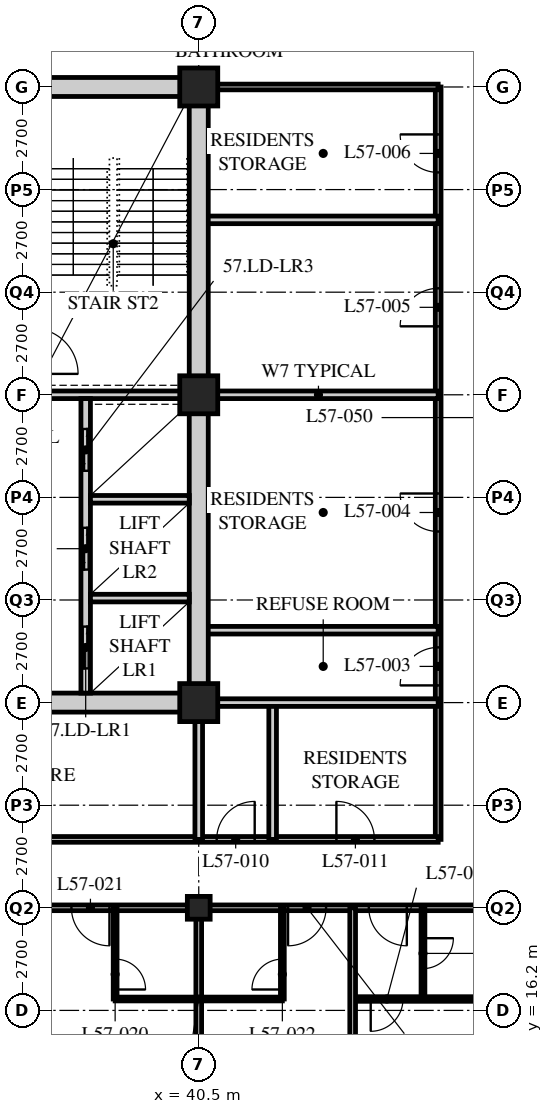
"""IFC4 building model, lengths in metres.
Left out: names, types, materials, properties, quantities, classifications, styles, units other than length and angle.
Written with IfcOpenShell. Run it as: python <this file> out.ifc"""

import sys

from ifc_helpers import new_model, si_unit, direction, frame, frame_2d, origin, origin_2d, place, context, subcontext, project, spatial, rectangle, hollow_rectangle, extrude, element, fill, save


model = new_model("IFC4")
c1 = context("Model", 3, precision=1e-05, world=origin(), true_north=direction((0.0, 1.0)))
c2 = subcontext(c1, "Body", "Model", "MODEL_VIEW")
j1 = project(units=[si_unit("LENGTHUNIT", "METRE"), si_unit("PLANEANGLEUNIT", "RADIAN")], contexts=[c1])
p1 = place(None, origin())
s1 = spatial("IfcSite", under=j1, at=p1, CompositionType="ELEMENT")
p2 = place(p1, origin())
s2 = spatial("IfcBuilding", under=s1, at=p2, CompositionType="ELEMENT")
p3 = place(p2, frame((0.0, 0.0, 220.8)))
s3 = spatial("IfcBuildingStorey", under=s2, at=p3, CompositionType="ELEMENT", Elevation=220.8)
p4 = place(p3, frame((40.5, 18.9, 0.0), z_axis=(0.0, 0.0, 1.0), x_axis=(1.0, 0.0, 0.0)))
e1 = element("IfcColumn", 1, at=p4, inside=s3, PredefinedType="COLUMN", context=c2, shape_type="SweptSolid", body=[
    extrude(hollow_rectangle(XDim=0.6, YDim=0.6, WallThickness=0.05, at=origin_2d()), origin(), (0.0, 0.0, 1.0), 3.6),
])
for number, where, z_axis, x_axis in (
    (2, (40.5, 24.3, 0.0), (0.0, 0.0, 1.0), (1.0, 0.0, 0.0)),
    (3, (40.5, 32.4, 0.0), (0.0, 0.0, 1.0), (1.0, 0.0, 0.0)),
    (4, (40.5, 40.5, 0.0), (0.0, 0.0, 1.0), (1.0, 0.0, 0.0)),
):
    element("IfcColumn", number, at=place(p3, frame(where, z_axis=z_axis, x_axis=x_axis)), inside=s3, PredefinedType="COLUMN", context=c2, shape_type="SweptSolid", body=[
        extrude(hollow_rectangle(XDim=1.0, YDim=1.0, WallThickness=0.1, at=origin_2d()), origin(), (0.0, 0.0, 1.0), 3.6),
    ])
p5 = place(p3, frame((12.15, 18.9, 0.0), z_axis=(0.0, 0.0, 1.0), x_axis=(1.0, 0.0, 0.0)))
e5 = element("IfcWall", 5, at=p5, inside=s3, PredefinedType="PARTITIONING", context=c2, shape_type="SweptSolid", body=[
    extrude(rectangle(XDim=36.45, YDim=0.15, at=frame_2d((18.225, 0.0))), origin(), (0.0, 0.0, 1.0), 2.628),
])
p6 = place(p5, frame((4.95, 0.0, 0.0)))
e6 = element("IfcOpeningElement", 6, at=p6, cuts=e5, PredefinedType="OPENING", context=c2, shape_type="SweptSolid", body=[
    extrude(rectangle(XDim=1.0, YDim=2.1, at=frame_2d((0.5, 1.05))), frame((0.0, 0.085, 0.0), z_axis=(0.0, -1.0, 0.0), x_axis=(1.0, 0.0, 0.0)), (0.0, 0.0, 1.0), 0.17),
])
p7 = place(p5, frame((22.6, 0.0, 0.0)))
e7 = element("IfcOpeningElement", 7, at=p7, cuts=e5, PredefinedType="OPENING", context=c2, shape_type="SweptSolid", body=[
    extrude(rectangle(XDim=1.0, YDim=2.1, at=frame_2d((0.5, 1.05))), frame((0.0, 0.085, 0.0), z_axis=(0.0, -1.0, 0.0), x_axis=(1.0, 0.0, 0.0)), (0.0, 0.0, 1.0), 0.17),
])
p8 = place(p5, frame((25.0, 0.0, 0.0)))
e8 = element("IfcOpeningElement", 8, at=p8, cuts=e5, PredefinedType="OPENING", context=c2, shape_type="SweptSolid", body=[
    extrude(rectangle(XDim=1.0, YDim=2.1, at=frame_2d((0.5, 1.05))), frame((0.0, 0.085, 0.0), z_axis=(0.0, -1.0, 0.0), x_axis=(1.0, 0.0, 0.0)), (0.0, 0.0, 1.0), 0.17),
])
p9 = place(p5, frame((30.7, 0.0, 0.0)))
e9 = element("IfcOpeningElement", 9, at=p9, cuts=e5, PredefinedType="OPENING", context=c2, shape_type="SweptSolid", body=[
    extrude(rectangle(XDim=1.0, YDim=2.1, at=frame_2d((0.5, 1.05))), frame((0.0, 0.085, 0.0), z_axis=(0.0, -1.0, 0.0), x_axis=(1.0, 0.0, 0.0)), (0.0, 0.0, 1.0), 0.17),
])
p10 = place(p5, frame((1.525, 0.0, 0.0)))
e10 = element("IfcOpeningElement", 10, at=p10, cuts=e5, PredefinedType="OPENING", context=c2, shape_type="SweptSolid", body=[
    extrude(rectangle(XDim=1.0, YDim=2.1, at=frame_2d((0.5, 1.05))), frame((0.0, 0.085, 0.0), z_axis=(0.0, -1.0, 0.0), x_axis=(1.0, 0.0, 0.0)), (0.0, 0.0, 1.0), 0.17),
])
p11 = place(p5, frame((32.825, 0.0, 0.0)))
e11 = element("IfcOpeningElement", 11, at=p11, cuts=e5, PredefinedType="OPENING", context=c2, shape_type="SweptSolid", body=[
    extrude(rectangle(XDim=1.0, YDim=2.1, at=frame_2d((0.5, 1.05))), frame((0.0, 0.085, 0.0), z_axis=(0.0, -1.0, 0.0), x_axis=(1.0, 0.0, 0.0)), (0.0, 0.0, 1.0), 0.17),
])
p12 = place(p3, frame((46.8, 20.7, 0.0), z_axis=(0.0, 0.0, 1.0), x_axis=(0.0, 1.0, 0.0)))
e12 = element("IfcWall", 12, at=p12, inside=s3, PredefinedType="PARTITIONING", context=c2, shape_type="SweptSolid", body=[
    extrude(rectangle(XDim=19.8, YDim=0.15, at=frame_2d((9.9, 0.0))), origin(), (0.0, 0.0, 1.0), 3.39),
])
p13 = place(p12, frame((4.052, 0.0, 0.0)))
e13 = element("IfcOpeningElement", 13, at=p13, cuts=e12, PredefinedType="OPENING", context=c2, shape_type="SweptSolid", body=[
    extrude(rectangle(XDim=1.0, YDim=2.1, at=frame_2d((0.5, 1.05))), frame((0.0, 0.085, 0.0), z_axis=(0.0, -1.0, 0.0), x_axis=(1.0, 0.0, 0.0)), (0.0, 0.0, 1.0), 0.17),
])
p14 = place(p12, frame((8.102, 0.0, 0.0)))
e14 = element("IfcOpeningElement", 14, at=p14, cuts=e12, PredefinedType="OPENING", context=c2, shape_type="SweptSolid", body=[
    extrude(rectangle(XDim=1.0, YDim=2.1, at=frame_2d((0.5, 1.05))), frame((0.0, 0.085, 0.0), z_axis=(0.0, -1.0, 0.0), x_axis=(1.0, 0.0, 0.0)), (0.0, 0.0, 1.0), 0.17),
])
p15 = place(p12, frame((13.502, 0.0, 0.0)))
e15 = element("IfcOpeningElement", 15, at=p15, cuts=e12, PredefinedType="OPENING", context=c2, shape_type="SweptSolid", body=[
    extrude(rectangle(XDim=1.0, YDim=2.1, at=frame_2d((0.5, 1.05))), frame((0.0, 0.085, 0.0), z_axis=(0.0, -1.0, 0.0), x_axis=(1.0, 0.0, 0.0)), (0.0, 0.0, 1.0), 0.17),
])
p16 = place(p12, frame((17.552, 0.0, 0.0)))
e16 = element("IfcOpeningElement", 16, at=p16, cuts=e12, PredefinedType="OPENING", context=c2, shape_type="SweptSolid", body=[
    extrude(rectangle(XDim=1.0, YDim=2.1, at=frame_2d((0.5, 1.05))), frame((0.0, 0.085, 0.0), z_axis=(0.0, -1.0, 0.0), x_axis=(1.0, 0.0, 0.0)), (0.0, 0.0, 1.0), 0.17),
])
p17 = place(p3, frame((46.8, 40.5, 0.0), z_axis=(0.0, 0.0, 1.0), x_axis=(-1.0, 0.0, 0.0)))
e17 = element("IfcWall", 17, at=p17, inside=s3, PredefinedType="PARTITIONING", context=c2, shape_type="SweptSolid", body=[
    extrude(rectangle(XDim=6.1, YDim=0.15, at=frame_2d((3.05, 0.0))), origin(), (0.0, 0.0, 1.0), 3.39),
])
p18 = place(p3, frame((29.56, 20.7, 0.0), z_axis=(0.0, 0.0, 1.0), x_axis=(1.0, 0.0, 0.0)))
e18 = element("IfcWall", 18, at=p18, inside=s3, PredefinedType="PARTITIONING", context=c2, shape_type="SweptSolid", body=[
    extrude(rectangle(XDim=17.24, YDim=0.15, at=frame_2d((8.62, 0.0))), origin(), (0.0, 0.0, 1.0), 3.39),
])
p19 = place(p18, frame((4.965, 0.0, 0.0)))
e19 = element("IfcOpeningElement", 19, at=p19, cuts=e18, PredefinedType="OPENING", context=c2, shape_type="SweptSolid", body=[
    extrude(rectangle(XDim=1.0, YDim=2.1, at=frame_2d((0.5, 1.05))), frame((0.0, 0.085, 0.0), z_axis=(0.0, -1.0, 0.0), x_axis=(1.0, 0.0, 0.0)), (0.0, 0.0, 1.0), 0.17),
])
p20 = place(p18, frame((11.412, 0.0, 0.0)))
e20 = element("IfcOpeningElement", 20, at=p20, cuts=e18, PredefinedType="OPENING", context=c2, shape_type="SweptSolid", body=[
    extrude(rectangle(XDim=1.0, YDim=2.1, at=frame_2d((0.5, 1.05))), frame((0.0, 0.085, 0.0), z_axis=(0.0, -1.0, 0.0), x_axis=(1.0, 0.0, 0.0)), (0.0, 0.0, 1.0), 0.17),
])
p21 = place(p18, frame((14.562, 0.0, 0.0)))
e21 = element("IfcOpeningElement", 21, at=p21, cuts=e18, PredefinedType="OPENING", context=c2, shape_type="SweptSolid", body=[
    extrude(rectangle(XDim=1.0, YDim=2.1, at=frame_2d((0.5, 1.05))), frame((0.0, 0.085, 0.0), z_axis=(0.0, -1.0, 0.0), x_axis=(1.0, 0.0, 0.0)), (0.0, 0.0, 1.0), 0.17),
])
for number, where, z_axis, x_axis in (
    (22, (40.5, 32.4, 0.0), (0.0, 0.0, 1.0), (1.0, 0.0, 0.0)),
    (23, (46.8, 26.205, 0.0), (0.0, 0.0, 1.0), (-1.0, 0.0, 0.0)),
    (24, (46.8, 37.003, 0.0), (0.0, 0.0, 1.0), (-1.0, 0.0, 0.0)),
):
    element("IfcWall", number, at=place(p3, frame(where, z_axis=z_axis, x_axis=x_axis)), inside=s3, PredefinedType="SOLIDWALL", context=c2, shape_type="SweptSolid", body=[
        extrude(rectangle(XDim=6.3, YDim=0.2, at=frame_2d((3.15, 0.0))), origin(), (0.0, 0.0, 1.0), 3.39),
    ])
p22 = place(p3, frame((40.5, 20.7, 0.0), z_axis=(0.0, 0.0, 1.0), x_axis=(0.0, 1.0, 0.0)))
e25 = element("IfcWall", 25, at=p22, inside=s3, PredefinedType="SOLIDWALL", context=c2, shape_type="SweptSolid", body=[
    extrude(rectangle(XDim=3.6, YDim=0.2, at=frame_2d((1.8, 0.0))), origin(), (0.0, 0.0, 1.0), 2.628),
])
p23 = place(p3, frame((42.444, 20.7, 0.0), z_axis=(0.0, 0.0, 1.0), x_axis=(0.0, 1.0, 0.0)))
e26 = element("IfcWall", 26, at=p23, inside=s3, PredefinedType="SOLIDWALL", context=c2, shape_type="SweptSolid", body=[
    extrude(rectangle(XDim=3.6, YDim=0.2, at=frame_2d((1.8, 0.0))), origin(), (0.0, 0.0, 1.0), 3.39),
])
p24 = place(p3, frame((40.5, 24.3, 0.0), z_axis=(0.0, 0.0, 1.0), x_axis=(1.0, 0.0, 0.0)))
e27 = element("IfcWall", 27, at=p24, inside=s3, PredefinedType="SOLIDWALL", context=c2, shape_type="SweptSolid", body=[
    extrude(rectangle(XDim=6.3, YDim=0.2, at=frame_2d((3.15, 0.0))), origin(), (0.0, 0.0, 1.0), 3.39),
])
p25 = place(p3, frame((38.3, 16.5, 0.0), z_axis=(0.0, 0.0, 1.0), x_axis=(1.0, 0.0, 0.0)))
e28 = element("IfcWall", 28, at=p25, inside=s3, PredefinedType="PARTITIONING", context=c2, shape_type="SweptSolid", body=[
    extrude(rectangle(XDim=4.4, YDim=0.1, at=frame_2d((2.2, 0.0))), origin(), (0.0, 0.0, 1.0), 3.39),
])
p26 = place(p3, frame((38.3, 18.9, 0.0), z_axis=(0.0, 0.0, 1.0), x_axis=(0.0, -1.0, 0.0)))
e29 = element("IfcWall", 29, at=p26, inside=s3, PredefinedType="PARTITIONING", context=c2, shape_type="SweptSolid", body=[
    extrude(rectangle(XDim=2.4, YDim=0.1, at=frame_2d((1.2, 0.0))), origin(), (0.0, 0.0, 1.0), 3.39),
])
p27 = place(p26, frame((1.35, 0.0, 0.0)))
e30 = element("IfcOpeningElement", 30, at=p27, cuts=e29, PredefinedType="OPENING", context=c2, shape_type="SweptSolid", body=[
    extrude(rectangle(XDim=0.8, YDim=2.1, at=frame_2d((0.4, 1.05))), frame((0.0, 0.06, 0.0), z_axis=(0.0, -1.0, 0.0), x_axis=(1.0, 0.0, 0.0)), (0.0, 0.0, 1.0), 0.12),
])
p28 = place(p3, frame((40.5, 18.9, 0.0), z_axis=(0.0, 0.0, 1.0), x_axis=(0.0, -1.0, 0.0)))
e31 = element("IfcWall", 31, at=p28, inside=s3, PredefinedType="PARTITIONING", context=c2, shape_type="SweptSolid", body=[
    extrude(rectangle(XDim=7.8, YDim=0.15, at=frame_2d((3.9, 0.0))), origin(), (0.0, 0.0, 1.0), 2.628),
])
p29 = place(p3, frame((42.7, 18.9, 0.0), z_axis=(0.0, 0.0, 1.0), x_axis=(0.0, -1.0, 0.0)))
e32 = element("IfcWall", 32, at=p29, inside=s3, PredefinedType="PARTITIONING", context=c2, shape_type="SweptSolid", body=[
    extrude(rectangle(XDim=2.4, YDim=0.1, at=frame_2d((1.2, 0.0))), origin(), (0.0, 0.0, 1.0), 3.39),
])
p30 = place(p29, frame((1.35, 0.0, 0.0)))
e33 = element("IfcOpeningElement", 33, at=p30, cuts=e32, PredefinedType="OPENING", context=c2, shape_type="SweptSolid", body=[
    extrude(rectangle(XDim=0.8, YDim=2.1, at=frame_2d((0.4, 1.05))), frame((0.0, 0.06, 0.0), z_axis=(0.0, -1.0, 0.0), x_axis=(1.0, 0.0, 0.0)), (0.0, 0.0, 1.0), 0.12),
])
p31 = place(p3, frame((44.55, 16.5, 0.0), z_axis=(0.0, 0.0, 1.0), x_axis=(1.0, 0.0, 0.0)))
e34 = element("IfcWall", 34, at=p31, inside=s3, PredefinedType="PARTITIONING", context=c2, shape_type="SweptSolid", body=[
    extrude(rectangle(XDim=4.05, YDim=0.12, at=frame_2d((2.025, 0.0))), origin(), (0.0, 0.0, 1.0), 3.39),
])
p32 = place(p31, frame((0.475, 0.0, 0.0)))
e35 = element("IfcOpeningElement", 35, at=p32, cuts=e34, PredefinedType="OPENING", context=c2, shape_type="SweptSolid", body=[
    extrude(rectangle(XDim=0.85, YDim=2.1, at=frame_2d((0.425, 1.05))), frame((0.0, 0.07, 0.0), z_axis=(0.0, -1.0, 0.0), x_axis=(1.0, 0.0, 0.0)), (0.0, 0.0, 1.0), 0.14),
])
p33 = place(p3, frame((46.4, 18.9, 0.0), z_axis=(0.0, 0.0, 1.0), x_axis=(0.0, -1.0, 0.0)))
e36 = element("IfcWall", 36, at=p33, inside=s3, PredefinedType="PARTITIONING", context=c2, shape_type="SweptSolid", body=[
    extrude(rectangle(XDim=2.4, YDim=0.1, at=frame_2d((1.2, 0.0))), origin(), (0.0, 0.0, 1.0), 3.39),
])
p34 = place(p33, frame((0.8, 0.0, 0.0)))
e37 = element("IfcOpeningElement", 37, at=p34, cuts=e36, PredefinedType="OPENING", context=c2, shape_type="SweptSolid", body=[
    extrude(rectangle(XDim=0.8, YDim=2.1, at=frame_2d((0.4, 1.05))), frame((0.0, 0.06, 0.0), z_axis=(0.0, -1.0, 0.0), x_axis=(1.0, 0.0, 0.0)), (0.0, 0.0, 1.0), 0.12),
])
p35 = place(p3, frame((44.55, 18.9, 0.0), z_axis=(0.0, 0.0, 1.0), x_axis=(0.0, -1.0, 0.0)))
e38 = element("IfcWall", 38, at=p35, inside=s3, PredefinedType="PARTITIONING", context=c2, shape_type="SweptSolid", body=[
    extrude(rectangle(XDim=7.8, YDim=0.15, at=frame_2d((3.9, 0.0))), origin(), (0.0, 0.0, 1.0), 3.39),
])
p36 = place(p3, frame((15.95, 24.3, 0.0), z_axis=(0.0, 0.0, 1.0), x_axis=(1.0, 0.0, 0.0)))
e39 = element("IfcWall", 39, at=p36, inside=s3, PredefinedType="SOLIDWALL", context=c2, shape_type="SweptSolid", body=[
    extrude(rectangle(XDim=24.8, YDim=0.5, at=frame_2d((12.4, 0.0))), origin(), (0.0, 0.0, 1.0), 2.628),
])
p37 = place(p36, frame((11.5, 0.0, 0.0)))
e40 = element("IfcOpeningElement", 40, at=p37, cuts=e39, PredefinedType="OPENING", context=c2, shape_type="SweptSolid", body=[
    extrude(rectangle(XDim=1.8, YDim=2.4, at=frame_2d((0.9, 1.2))), frame((0.0, 0.26, 0.0), z_axis=(0.0, -1.0, 0.0), x_axis=(1.0, 0.0, 0.0)), (0.0, 0.0, 1.0), 0.52),
])
p38 = place(p3, frame((15.95, 40.5, 0.0), z_axis=(0.0, 0.0, 1.0), x_axis=(1.0, 0.0, 0.0)))
e41 = element("IfcWall", 41, at=p38, inside=s3, PredefinedType="SOLIDWALL", context=c2, shape_type="SweptSolid", body=[
    extrude(rectangle(XDim=24.8, YDim=0.5, at=frame_2d((12.4, 0.0))), origin(), (0.0, 0.0, 1.0), 2.628),
])
p39 = place(p38, frame((11.5, 0.0, 0.0)))
e42 = element("IfcOpeningElement", 42, at=p39, cuts=e41, PredefinedType="OPENING", context=c2, shape_type="SweptSolid", body=[
    extrude(rectangle(XDim=1.8, YDim=2.4, at=frame_2d((0.9, 1.2))), frame((0.0, 0.26, 0.0), z_axis=(0.0, -1.0, 0.0), x_axis=(1.0, 0.0, 0.0)), (0.0, 0.0, 1.0), 0.52),
])
p40 = place(p3, frame((40.5, 24.55, 0.0), z_axis=(0.0, 0.0, 1.0), x_axis=(0.0, 1.0, 0.0)))
e43 = element("IfcWall", 43, at=p40, inside=s3, PredefinedType="SOLIDWALL", context=c2, shape_type="SweptSolid", body=[
    extrude(rectangle(XDim=15.7, YDim=0.5, at=frame_2d((7.85, 0.0))), origin(), (0.0, 0.0, 1.0), 2.628),
])
p41 = place(p3, frame((32.3, 32.4, 0.0), z_axis=(0.0, 0.0, 1.0), x_axis=(1.0, 0.0, 0.0)))
e44 = element("IfcWall", 44, at=p41, inside=s3, PredefinedType="SOLIDWALL", context=c2, shape_type="SweptSolid", body=[
    extrude(rectangle(XDim=7.95, YDim=0.2, at=frame_2d((3.975, 0.0))), origin(), (0.0, 0.0, 1.0), 2.778),
])
p42 = place(p3, frame((37.525, 24.55, 0.0), z_axis=(0.0, 0.0, 1.0), x_axis=(0.0, 1.0, 0.0)))
e45 = element("IfcWall", 45, at=p42, inside=s3, PredefinedType="SOLIDWALL", context=c2, shape_type="SweptSolid", body=[
    extrude(rectangle(XDim=7.75, YDim=0.25, at=frame_2d((3.875, 0.0))), origin(), (0.0, 0.0, 1.0), 3.39),
])
p43 = place(p42, frame((0.65, 0.0, 0.0)))
e46 = element("IfcOpeningElement", 46, at=p43, cuts=e45, PredefinedType="OPENING", context=c2, shape_type="SweptSolid", body=[
    extrude(rectangle(XDim=1.1, YDim=2.4, at=frame_2d((0.55, 1.2))), frame((0.0, 0.135, 0.0), z_axis=(0.0, -1.0, 0.0), x_axis=(1.0, 0.0, 0.0)), (0.0, 0.0, 1.0), 0.27),
])
p44 = place(p42, frame((3.25, 0.0, 0.0)))
e47 = element("IfcOpeningElement", 47, at=p44, cuts=e45, PredefinedType="OPENING", context=c2, shape_type="SweptSolid", body=[
    extrude(rectangle(XDim=1.1, YDim=2.4, at=frame_2d((0.55, 1.2))), frame((0.0, 0.135, 0.0), z_axis=(0.0, -1.0, 0.0), x_axis=(1.0, 0.0, 0.0)), (0.0, 0.0, 1.0), 0.27),
])
p45 = place(p42, frame((5.85, 0.0, 0.0)))
e48 = element("IfcOpeningElement", 48, at=p45, cuts=e45, PredefinedType="OPENING", context=c2, shape_type="SweptSolid", body=[
    extrude(rectangle(XDim=1.1, YDim=2.4, at=frame_2d((0.55, 1.2))), frame((0.0, 0.135, 0.0), z_axis=(0.0, -1.0, 0.0), x_axis=(1.0, 0.0, 0.0)), (0.0, 0.0, 1.0), 0.27),
])
for number, where, z_axis, x_axis in (
    (49, (37.65, 27.05, 0.0), (0.0, 0.0, 1.0), (1.0, 0.0, 0.0)),
    (50, (37.65, 29.65, 0.0), (0.0, 0.0, 1.0), (1.0, 0.0, 0.0)),
):
    element("IfcWall", number, at=place(p3, frame(where, z_axis=z_axis, x_axis=x_axis)), inside=s3, PredefinedType="SOLIDWALL", context=c2, shape_type="SweptSolid", body=[
        extrude(rectangle(XDim=2.6, YDim=0.2, at=frame_2d((1.3, 0.0))), origin(), (0.0, 0.0, 1.0), 3.39),
    ])
p46 = place(p13, origin())
e51 = element("IfcDoor", 51, at=p46, inside=s3, OperationType="SINGLE_SWING_LEFT", PredefinedType="DOOR", context=c2, shape_type="SweptSolid", body=[
    extrude(rectangle(XDim=1.0, YDim=2.1, at=frame_2d((0.5, 1.05))), frame((0.0, 0.025, 0.0), z_axis=(0.0, -1.0, 0.0), x_axis=(1.0, 0.0, 0.0)), (0.0, 0.0, 1.0), 0.05),
])
fill(e13, e51)
p47 = place(p14, origin())
e52 = element("IfcDoor", 52, at=p47, inside=s3, OperationType="SINGLE_SWING_RIGHT", PredefinedType="DOOR", context=c2, shape_type="SweptSolid", body=[
    extrude(rectangle(XDim=1.0, YDim=2.1, at=frame_2d((0.5, 1.05))), frame((0.0, 0.025, 0.0), z_axis=(0.0, -1.0, 0.0), x_axis=(1.0, 0.0, 0.0)), (0.0, 0.0, 1.0), 0.05),
])
fill(e14, e52)
p48 = place(p15, origin())
e53 = element("IfcDoor", 53, at=p48, inside=s3, OperationType="SINGLE_SWING_LEFT", PredefinedType="DOOR", context=c2, shape_type="SweptSolid", body=[
    extrude(rectangle(XDim=1.0, YDim=2.1, at=frame_2d((0.5, 1.05))), frame((0.0, 0.025, 0.0), z_axis=(0.0, -1.0, 0.0), x_axis=(1.0, 0.0, 0.0)), (0.0, 0.0, 1.0), 0.05),
])
fill(e15, e53)
p49 = place(p16, origin())
e54 = element("IfcDoor", 54, at=p49, inside=s3, OperationType="SINGLE_SWING_RIGHT", PredefinedType="DOOR", context=c2, shape_type="SweptSolid", body=[
    extrude(rectangle(XDim=1.0, YDim=2.1, at=frame_2d((0.5, 1.05))), frame((0.0, 0.025, 0.0), z_axis=(0.0, -1.0, 0.0), x_axis=(1.0, 0.0, 0.0)), (0.0, 0.0, 1.0), 0.05),
])
fill(e16, e54)
p50 = place(p20, origin())
e55 = element("IfcDoor", 55, at=p50, inside=s3, OperationType="SINGLE_SWING_RIGHT", PredefinedType="DOOR", context=c2, shape_type="SweptSolid", body=[
    extrude(rectangle(XDim=1.0, YDim=2.1, at=frame_2d((0.5, 1.05))), frame((0.0, 0.025, 0.0), z_axis=(0.0, -1.0, 0.0), x_axis=(1.0, 0.0, 0.0)), (0.0, 0.0, 1.0), 0.05),
])
fill(e20, e55)
p51 = place(p21, origin())
e56 = element("IfcDoor", 56, at=p51, inside=s3, OperationType="SINGLE_SWING_LEFT", PredefinedType="DOOR", context=c2, shape_type="SweptSolid", body=[
    extrude(rectangle(XDim=1.0, YDim=2.1, at=frame_2d((0.5, 1.05))), frame((0.0, 0.025, 0.0), z_axis=(0.0, -1.0, 0.0), x_axis=(1.0, 0.0, 0.0)), (0.0, 0.0, 1.0), 0.05),
])
fill(e21, e56)
p52 = place(p27, origin())
e57 = element("IfcDoor", 57, at=p52, inside=s3, OperationType="SINGLE_SWING_RIGHT", PredefinedType="DOOR", context=c2, shape_type="SweptSolid", body=[
    extrude(rectangle(XDim=0.8, YDim=2.1, at=frame_2d((0.4, 1.05))), frame((0.0, 0.025, 0.0), z_axis=(0.0, -1.0, 0.0), x_axis=(1.0, 0.0, 0.0)), (0.0, 0.0, 1.0), 0.05),
])
fill(e30, e57)
p53 = place(p8, origin())
e58 = element("IfcDoor", 58, at=p53, inside=s3, OperationType="SINGLE_SWING_LEFT", PredefinedType="DOOR", context=c2, shape_type="SweptSolid", body=[
    extrude(rectangle(XDim=1.0, YDim=2.1, at=frame_2d((0.5, 1.05))), frame((0.0, 0.025, 0.0), z_axis=(0.0, -1.0, 0.0), x_axis=(1.0, 0.0, 0.0)), (0.0, 0.0, 1.0), 0.05),
])
fill(e8, e58)
p54 = place(p30, origin())
e59 = element("IfcDoor", 59, at=p54, inside=s3, OperationType="SINGLE_SWING_LEFT", PredefinedType="DOOR", context=c2, shape_type="SweptSolid", body=[
    extrude(rectangle(XDim=0.8, YDim=2.1, at=frame_2d((0.4, 1.05))), frame((0.0, 0.025, 0.0), z_axis=(0.0, -1.0, 0.0), x_axis=(1.0, 0.0, 0.0)), (0.0, 0.0, 1.0), 0.05),
])
fill(e33, e59)
p55 = place(p9, origin())
e60 = element("IfcDoor", 60, at=p55, inside=s3, OperationType="SINGLE_SWING_RIGHT", PredefinedType="DOOR", context=c2, shape_type="SweptSolid", body=[
    extrude(rectangle(XDim=1.0, YDim=2.1, at=frame_2d((0.5, 1.05))), frame((0.0, 0.025, 0.0), z_axis=(0.0, -1.0, 0.0), x_axis=(1.0, 0.0, 0.0)), (0.0, 0.0, 1.0), 0.05),
])
fill(e9, e60)
p56 = place(p34, origin())
e61 = element("IfcDoor", 61, at=p56, inside=s3, OperationType="SINGLE_SWING_LEFT", PredefinedType="DOOR", context=c2, shape_type="SweptSolid", body=[
    extrude(rectangle(XDim=0.8, YDim=2.1, at=frame_2d((0.4, 1.05))), frame((0.0, 0.025, 0.0), z_axis=(0.0, -1.0, 0.0), x_axis=(1.0, 0.0, 0.0)), (0.0, 0.0, 1.0), 0.05),
])
fill(e37, e61)
p57 = place(p11, origin())
e62 = element("IfcDoor", 62, at=p57, inside=s3, OperationType="SINGLE_SWING_LEFT", PredefinedType="DOOR", context=c2, shape_type="SweptSolid", body=[
    extrude(rectangle(XDim=1.0, YDim=2.1, at=frame_2d((0.5, 1.05))), frame((0.0, 0.025, 0.0), z_axis=(0.0, -1.0, 0.0), x_axis=(1.0, 0.0, 0.0)), (0.0, 0.0, 1.0), 0.05),
])
fill(e11, e62)
p58 = place(p32, origin())
e63 = element("IfcDoor", 63, at=p58, inside=s3, OperationType="SINGLE_SWING_RIGHT", PredefinedType="DOOR", context=c2, shape_type="SweptSolid", body=[
    extrude(rectangle(XDim=0.85, YDim=2.1, at=frame_2d((0.425, 1.05))), frame((0.0, 0.025, 0.0), z_axis=(0.0, -1.0, 0.0), x_axis=(1.0, 0.0, 0.0)), (0.0, 0.0, 1.0), 0.05),
])
fill(e35, e63)
p59 = place(p43, origin())
e64 = element("IfcDoor", 64, at=p59, inside=s3, OperationType="DOUBLE_DOOR_SLIDING", PredefinedType="DOOR", context=c2, shape_type="SweptSolid", body=[
    extrude(rectangle(XDim=1.1, YDim=2.4, at=frame_2d((0.55, 1.2))), frame((0.0, 0.025, 0.0), z_axis=(0.0, -1.0, 0.0), x_axis=(1.0, 0.0, 0.0)), (0.0, 0.0, 1.0), 0.05),
])
fill(e46, e64)
p60 = place(p44, origin())
e65 = element("IfcDoor", 65, at=p60, inside=s3, OperationType="DOUBLE_DOOR_SLIDING", PredefinedType="DOOR", context=c2, shape_type="SweptSolid", body=[
    extrude(rectangle(XDim=1.1, YDim=2.4, at=frame_2d((0.55, 1.2))), frame((0.0, 0.025, 0.0), z_axis=(0.0, -1.0, 0.0), x_axis=(1.0, 0.0, 0.0)), (0.0, 0.0, 1.0), 0.05),
])
fill(e47, e65)
p61 = place(p45, origin())
e66 = element("IfcDoor", 66, at=p61, inside=s3, OperationType="DOUBLE_DOOR_SLIDING", PredefinedType="DOOR", context=c2, shape_type="SweptSolid", body=[
    extrude(rectangle(XDim=1.1, YDim=2.4, at=frame_2d((0.55, 1.2))), frame((0.0, 0.025, 0.0), z_axis=(0.0, -1.0, 0.0), x_axis=(1.0, 0.0, 0.0)), (0.0, 0.0, 1.0), 0.05),
])
fill(e48, e66)
save(model, sys.argv[1])
